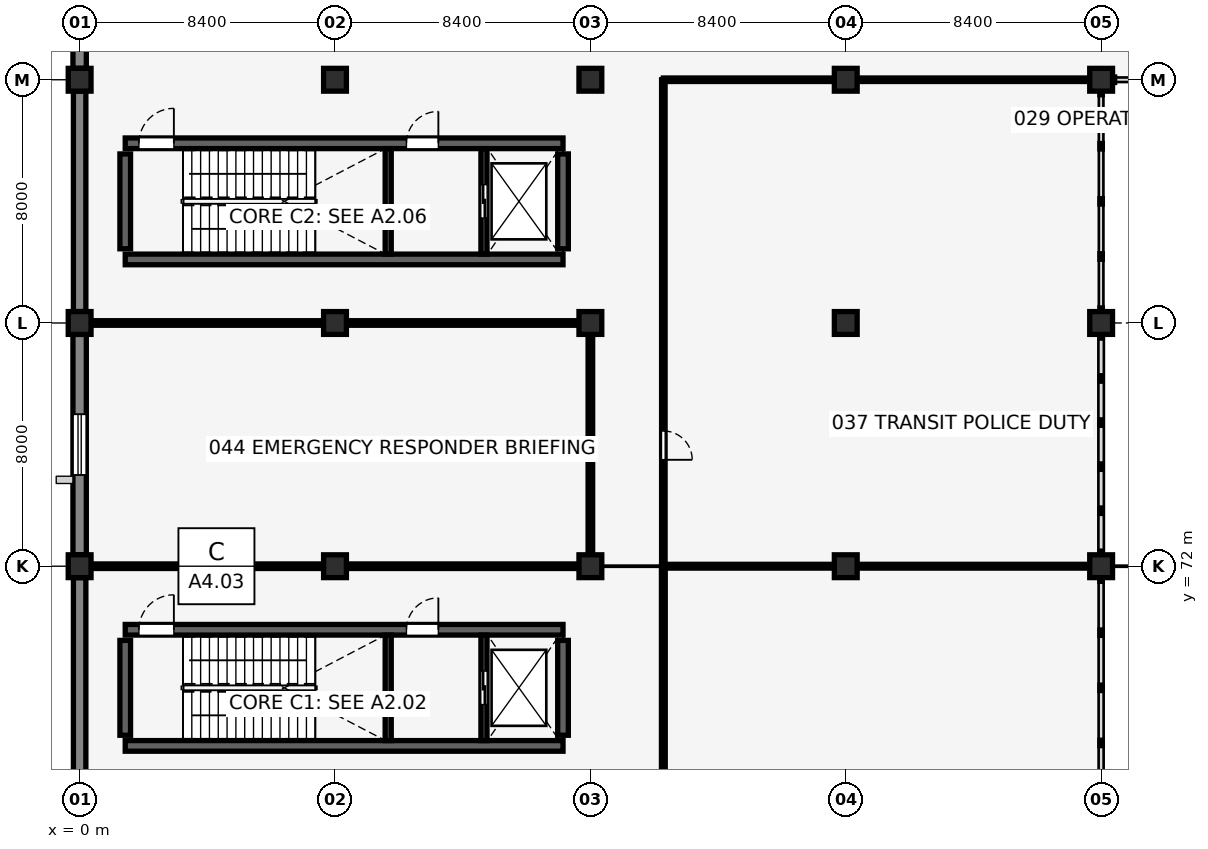
"""IFC4 building model, lengths in metres.
Left out: names, types, materials, properties, quantities, classifications, styles, units other than length and angle.
Written with IfcOpenShell. Run it as: python <this file> out.ifc"""

import sys

from ifc_helpers import new_model, si_unit, direction, frame, frame_2d, origin, origin_2d, place, context, subcontext, project, spatial, rectangle, extrude, element, fill, save


model = new_model("IFC4")
c1 = context("Model", 3, precision=1e-05, world=origin(), true_north=direction((0.0, 1.0)))
c2 = subcontext(c1, "Body", "Model", "MODEL_VIEW")
j1 = project(units=[si_unit("LENGTHUNIT", "METRE"), si_unit("PLANEANGLEUNIT", "RADIAN")], contexts=[c1])
p1 = place(None, origin())
s1 = spatial("IfcSite", under=j1, at=p1, CompositionType="ELEMENT")
p2 = place(p1, origin())
s2 = spatial("IfcBuilding", under=s1, at=p2, CompositionType="ELEMENT")
p3 = place(p2, origin())
s3 = spatial("IfcBuildingStorey", under=s2, at=p3, CompositionType="ELEMENT", Elevation=0.0)
p4 = place(p3, frame((1.5, 66.09, 0.0), z_axis=(0.0, 0.0, 1.0), x_axis=(1.0, 0.0, 0.0)))
e1 = element("IfcWall", 1, at=p4, inside=s3, PredefinedType="SHEAR", context=c2, shape_type="SweptSolid", body=[
    extrude(rectangle(XDim=14.4, YDim=0.35, at=frame_2d((7.2, 0.0))), origin(), (0.0, 0.0, 1.0), 5.15),
])
p5 = place(p3, frame((1.5, 69.91, 0.0), z_axis=(0.0, 0.0, 1.0), x_axis=(1.0, 0.0, 0.0)))
e2 = element("IfcWall", 2, at=p5, inside=s3, PredefinedType="SHEAR", context=c2, shape_type="SweptSolid", body=[
    extrude(rectangle(XDim=14.4, YDim=0.35, at=frame_2d((7.2, 0.0))), origin(), (0.0, 0.0, 1.0), 5.15),
])
p6 = place(p5, frame((0.45, 0.0, 0.0), z_axis=(0.0, 0.0, 1.0), x_axis=(1.0, 0.0, 0.0)))
e3 = element("IfcOpeningElement", 3, at=p6, cuts=e2, PredefinedType="OPENING", context=c2, shape_type="SweptSolid", body=[
    extrude(rectangle(XDim=1.15, YDim=2.15, at=frame_2d((0.575, 1.075))), frame((0.0, 0.185, 0.0), z_axis=(0.0, -1.0, 0.0), x_axis=(1.0, 0.0, 0.0)), (0.0, 0.0, 1.0), 0.37),
])
p7 = place(p5, frame((9.25, 0.0, 0.0), z_axis=(0.0, 0.0, 1.0), x_axis=(1.0, 0.0, 0.0)))
e4 = element("IfcOpeningElement", 4, at=p7, cuts=e2, PredefinedType="OPENING", context=c2, shape_type="SweptSolid", body=[
    extrude(rectangle(XDim=1.05, YDim=2.15, at=frame_2d((0.525, 1.075))), frame((0.0, 0.185, 0.0), z_axis=(0.0, -1.0, 0.0), x_axis=(1.0, 0.0, 0.0)), (0.0, 0.0, 1.0), 0.37),
])
for number, where, z_axis, x_axis in (
    (5, (1.5, 66.44, 0.0), (0.0, 0.0, 1.0), (0.0, 1.0, 0.0)),
    (6, (15.9, 66.44, 0.0), (0.0, 0.0, 1.0), (0.0, 1.0, 0.0)),
):
    element("IfcWall", number, at=place(p3, frame(where, z_axis=z_axis, x_axis=x_axis)), inside=s3, PredefinedType="SHEAR", context=c2, shape_type="SweptSolid", body=[
        extrude(rectangle(XDim=3.12, YDim=0.35, at=frame_2d((1.56, 0.0))), origin(), (0.0, 0.0, 1.0), 5.15),
    ])
p8 = place(p3, frame((1.5, 82.09, 0.0), z_axis=(0.0, 0.0, 1.0), x_axis=(1.0, 0.0, 0.0)))
e7 = element("IfcWall", 7, at=p8, inside=s3, PredefinedType="SHEAR", context=c2, shape_type="SweptSolid", body=[
    extrude(rectangle(XDim=14.4, YDim=0.35, at=frame_2d((7.2, 0.0))), origin(), (0.0, 0.0, 1.0), 5.15),
])
p9 = place(p3, frame((1.5, 85.91, 0.0), z_axis=(0.0, 0.0, 1.0), x_axis=(1.0, 0.0, 0.0)))
e8 = element("IfcWall", 8, at=p9, inside=s3, PredefinedType="SHEAR", context=c2, shape_type="SweptSolid", body=[
    extrude(rectangle(XDim=14.4, YDim=0.35, at=frame_2d((7.2, 0.0))), origin(), (0.0, 0.0, 1.0), 5.15),
])
p10 = place(p9, frame((0.45, 0.0, 0.0), z_axis=(0.0, 0.0, 1.0), x_axis=(1.0, 0.0, 0.0)))
e9 = element("IfcOpeningElement", 9, at=p10, cuts=e8, PredefinedType="OPENING", context=c2, shape_type="SweptSolid", body=[
    extrude(rectangle(XDim=1.15, YDim=2.15, at=frame_2d((0.575, 1.075))), frame((0.0, 0.185, 0.0), z_axis=(0.0, -1.0, 0.0), x_axis=(1.0, 0.0, 0.0)), (0.0, 0.0, 1.0), 0.37),
])
p11 = place(p9, frame((9.25, 0.0, 0.0), z_axis=(0.0, 0.0, 1.0), x_axis=(1.0, 0.0, 0.0)))
e10 = element("IfcOpeningElement", 10, at=p11, cuts=e8, PredefinedType="OPENING", context=c2, shape_type="SweptSolid", body=[
    extrude(rectangle(XDim=1.05, YDim=2.15, at=frame_2d((0.525, 1.075))), frame((0.0, 0.185, 0.0), z_axis=(0.0, -1.0, 0.0), x_axis=(1.0, 0.0, 0.0)), (0.0, 0.0, 1.0), 0.37),
])
for number, where, z_axis, x_axis in (
    (11, (1.5, 82.44, 0.0), (0.0, 0.0, 1.0), (0.0, 1.0, 0.0)),
    (12, (15.9, 82.44, 0.0), (0.0, 0.0, 1.0), (0.0, 1.0, 0.0)),
):
    element("IfcWall", number, at=place(p3, frame(where, z_axis=z_axis, x_axis=x_axis)), inside=s3, PredefinedType="SHEAR", context=c2, shape_type="SweptSolid", body=[
        extrude(rectangle(XDim=3.12, YDim=0.35, at=frame_2d((1.56, 0.0))), origin(), (0.0, 0.0, 1.0), 5.15),
    ])
for number, where, z_axis, x_axis in (
    (13, (0.0, 72.0, 0.0), (0.0, 0.0, 1.0), (1.0, 0.0, 0.0)),
    (14, (0.0, 80.0, 0.0), (0.0, 0.0, 1.0), (1.0, 0.0, 0.0)),
    (15, (0.0, 88.0, 0.0), (0.0, 0.0, 1.0), (1.0, 0.0, 0.0)),
    (16, (8.4, 72.0, 0.0), (0.0, 0.0, 1.0), (1.0, 0.0, 0.0)),
    (17, (8.4, 80.0, 0.0), (0.0, 0.0, 1.0), (1.0, 0.0, 0.0)),
    (18, (8.4, 88.0, 0.0), (0.0, 0.0, 1.0), (1.0, 0.0, 0.0)),
    (19, (16.8, 72.0, 0.0), (0.0, 0.0, 1.0), (1.0, 0.0, 0.0)),
    (20, (16.8, 80.0, 0.0), (0.0, 0.0, 1.0), (1.0, 0.0, 0.0)),
    (21, (16.8, 88.0, 0.0), (0.0, 0.0, 1.0), (1.0, 0.0, 0.0)),
    (22, (25.2, 72.0, 0.0), (0.0, 0.0, 1.0), (1.0, 0.0, 0.0)),
    (23, (25.2, 80.0, 0.0), (0.0, 0.0, 1.0), (1.0, 0.0, 0.0)),
    (24, (25.2, 88.0, 0.0), (0.0, 0.0, 1.0), (1.0, 0.0, 0.0)),
    (25, (33.6, 72.0, 0.0), (0.0, 0.0, 1.0), (1.0, 0.0, 0.0)),
    (26, (33.6, 80.0, 0.0), (0.0, 0.0, 1.0), (1.0, 0.0, 0.0)),
    (27, (33.6, 88.0, 0.0), (0.0, 0.0, 1.0), (1.0, 0.0, 0.0)),
):
    element("IfcColumn", number, at=place(p3, frame(where, z_axis=z_axis, x_axis=x_axis)), inside=s3, PredefinedType="COLUMN", context=c2, shape_type="SweptSolid", body=[
        extrude(rectangle(XDim=0.75, YDim=0.75, at=origin_2d()), origin(), (0.0, 0.0, 1.0), 5.15),
    ])
p12 = place(p3, frame((0.0, 64.375, 0.0), z_axis=(0.0, 0.0, 1.0), x_axis=(0.0, 1.0, 0.0)))
e28 = element("IfcWall", 28, at=p12, inside=s3, PredefinedType="SOLIDWALL", context=c2, shape_type="SweptSolid", body=[
    extrude(rectangle(XDim=7.25, YDim=0.41, at=frame_2d((3.625, 0.0))), origin(), (0.0, 0.0, 1.0), 4.85),
])
p13 = place(p3, frame((0.0, 72.375, 0.0), z_axis=(0.0, 0.0, 1.0), x_axis=(0.0, 1.0, 0.0)))
e29 = element("IfcWall", 29, at=p13, inside=s3, PredefinedType="SOLIDWALL", context=c2, shape_type="SweptSolid", body=[
    extrude(rectangle(XDim=7.25, YDim=0.44, at=frame_2d((3.625, 0.0))), origin(), (0.0, 0.0, 1.0), 4.747),
])
p14 = place(p13, frame((2.625, 0.0, 0.9), z_axis=(0.0, 0.0, 1.0), x_axis=(1.0, 0.0, 0.0)))
e30 = element("IfcOpeningElement", 30, at=p14, cuts=e29, PredefinedType="OPENING", context=c2, shape_type="SweptSolid", body=[
    extrude(rectangle(XDim=2.0, YDim=1.5, at=frame_2d((1.0, 0.75))), frame((0.0, 0.23, 0.0), z_axis=(0.0, -1.0, 0.0), x_axis=(1.0, 0.0, 0.0)), (0.0, 0.0, 1.0), 0.46),
])
p15 = place(p3, frame((0.0, 80.375, 0.0), z_axis=(0.0, 0.0, 1.0), x_axis=(0.0, 1.0, 0.0)))
e31 = element("IfcWall", 31, at=p15, inside=s3, PredefinedType="SOLIDWALL", context=c2, shape_type="SweptSolid", body=[
    extrude(rectangle(XDim=7.25, YDim=0.41, at=frame_2d((3.625, 0.0))), origin(), (0.0, 0.0, 1.0), 4.85),
])
p16 = place(p3, frame((0.0, 88.375, 0.0), z_axis=(0.0, 0.0, 1.0), x_axis=(0.0, 1.0, 0.0)))
e32 = element("IfcWall", 32, at=p16, inside=s3, PredefinedType="SOLIDWALL", context=c2, shape_type="SweptSolid", body=[
    extrude(rectangle(XDim=7.25, YDim=0.44, at=frame_2d((3.625, 0.0))), origin(), (0.0, 0.0, 1.0), 4.747),
])
p17 = place(p16, frame((2.725, 0.0, 0.9), z_axis=(0.0, 0.0, 1.0), x_axis=(1.0, 0.0, 0.0)))
e33 = element("IfcOpeningElement", 33, at=p17, cuts=e32, PredefinedType="OPENING", context=c2, shape_type="SweptSolid", body=[
    extrude(rectangle(XDim=1.8, YDim=1.45, at=frame_2d((0.9, 0.725))), frame((0.0, 0.23, 0.0), z_axis=(0.0, -1.0, 0.0), x_axis=(1.0, 0.0, 0.0)), (0.0, 0.0, 1.0), 0.46),
])
p18 = place(p3, frame((10.15, 66.265, 0.0), z_axis=(0.0, 0.0, 1.0), x_axis=(0.0, 1.0, 0.0)))
e34 = element("IfcWall", 34, at=p18, inside=s3, PredefinedType="SHEAR", context=c2, shape_type="SweptSolid", body=[
    extrude(rectangle(XDim=3.47, YDim=0.2, at=frame_2d((1.735, 0.0))), origin(), (0.0, 0.0, 1.0), 5.15),
])
p19 = place(p3, frame((13.3, 66.265, 0.0), z_axis=(0.0, 0.0, 1.0), x_axis=(0.0, 1.0, 0.0)))
e35 = element("IfcWall", 35, at=p19, inside=s3, PredefinedType="SHEAR", context=c2, shape_type="SweptSolid", body=[
    extrude(rectangle(XDim=3.47, YDim=0.2, at=frame_2d((1.735, 0.0))), origin(), (0.0, 0.0, 1.0), 5.15),
])
p20 = place(p19, frame((1.185, 0.0, 0.0), z_axis=(0.0, 0.0, 1.0), x_axis=(1.0, 0.0, 0.0)))
e36 = element("IfcOpeningElement", 36, at=p20, cuts=e35, PredefinedType="OPENING", context=c2, shape_type="SweptSolid", body=[
    extrude(rectangle(XDim=1.1, YDim=2.15, at=frame_2d((0.55, 1.075))), frame((0.0, 0.11, 0.0), z_axis=(0.0, -1.0, 0.0), x_axis=(1.0, 0.0, 0.0)), (0.0, 0.0, 1.0), 0.22),
])
p21 = place(p3, frame((10.15, 82.265, 0.0), z_axis=(0.0, 0.0, 1.0), x_axis=(0.0, 1.0, 0.0)))
e37 = element("IfcWall", 37, at=p21, inside=s3, PredefinedType="SHEAR", context=c2, shape_type="SweptSolid", body=[
    extrude(rectangle(XDim=3.47, YDim=0.2, at=frame_2d((1.735, 0.0))), origin(), (0.0, 0.0, 1.0), 5.15),
])
p22 = place(p3, frame((13.3, 82.265, 0.0), z_axis=(0.0, 0.0, 1.0), x_axis=(0.0, 1.0, 0.0)))
e38 = element("IfcWall", 38, at=p22, inside=s3, PredefinedType="SHEAR", context=c2, shape_type="SweptSolid", body=[
    extrude(rectangle(XDim=3.47, YDim=0.2, at=frame_2d((1.735, 0.0))), origin(), (0.0, 0.0, 1.0), 5.15),
])
p23 = place(p22, frame((1.185, 0.0, 0.0), z_axis=(0.0, 0.0, 1.0), x_axis=(1.0, 0.0, 0.0)))
e39 = element("IfcOpeningElement", 39, at=p23, cuts=e38, PredefinedType="OPENING", context=c2, shape_type="SweptSolid", body=[
    extrude(rectangle(XDim=1.1, YDim=2.15, at=frame_2d((0.55, 1.075))), frame((0.0, 0.11, 0.0), z_axis=(0.0, -1.0, 0.0), x_axis=(1.0, 0.0, 0.0)), (0.0, 0.0, 1.0), 0.22),
])
p24 = place(p3, frame((0.365, 72.0, 0.0), z_axis=(0.0, 0.0, 1.0), x_axis=(1.0, 0.0, 0.0)))
e40 = element("IfcWall", 40, at=p24, inside=s3, PredefinedType="PARTITIONING", context=c2, shape_type="SweptSolid", body=[
    extrude(rectangle(XDim=7.67, YDim=0.15, at=frame_2d((3.835, 0.0))), origin(), (0.0, 0.0, 1.0), 4.605),
])
p25 = place(p24, frame((3.335, 0.0, 0.0), z_axis=(0.0, 0.0, 1.0), x_axis=(1.0, 0.0, 0.0)))
e41 = element("IfcOpeningElement", 41, at=p25, cuts=e40, PredefinedType="OPENING", context=c2, shape_type="SweptSolid", body=[
    extrude(rectangle(XDim=1.0, YDim=2.15, at=frame_2d((0.5, 1.075))), frame((0.0, 0.085, 0.0), z_axis=(0.0, -1.0, 0.0), x_axis=(1.0, 0.0, 0.0)), (0.0, 0.0, 1.0), 0.17),
])
p26 = place(p3, frame((19.2, 48.04, 0.0), z_axis=(0.0, 0.0, 1.0), x_axis=(0.0, 1.0, 0.0)))
e42 = element("IfcWall", 42, at=p26, inside=s3, PredefinedType="PARTITIONING", context=c2, shape_type="SweptSolid", body=[
    extrude(rectangle(XDim=23.96, YDim=0.125, at=frame_2d((11.98, 0.0))), origin(), (0.0, 0.0, 1.0), 5.15),
])
p27 = place(p26, frame((4.44, 0.0, 0.0), z_axis=(0.0, 0.0, 1.0), x_axis=(-1.0, 0.0, 0.0)))
e43 = element("IfcOpeningElement", 43, at=p27, cuts=e42, PredefinedType="OPENING", context=c2, shape_type="SweptSolid", body=[
    extrude(rectangle(XDim=0.98, YDim=2.15, at=frame_2d((0.49, 1.075))), frame((0.0, 0.073, 0.0), z_axis=(0.0, -1.0, 0.0), x_axis=(1.0, 0.0, 0.0)), (0.0, 0.0, 1.0), 0.145),
])
p28 = place(p3, frame((19.2, 72.0, 0.0), z_axis=(0.0, 0.0, 1.0), x_axis=(0.0, 1.0, 0.0)))
e44 = element("IfcWall", 44, at=p28, inside=s3, PredefinedType="PARTITIONING", context=c2, shape_type="SweptSolid", body=[
    extrude(rectangle(XDim=16.0, YDim=0.115, at=frame_2d((8.0, 0.0))), origin(), (0.0, 0.0, 1.0), 5.15),
])
p29 = place(p28, frame((4.45, 0.0, 0.0), z_axis=(0.0, 0.0, 1.0), x_axis=(-1.0, 0.0, 0.0)))
e45 = element("IfcOpeningElement", 45, at=p29, cuts=e44, PredefinedType="OPENING", context=c2, shape_type="SweptSolid", body=[
    extrude(rectangle(XDim=0.95, YDim=2.15, at=frame_2d((0.475, 1.075))), frame((0.0, 0.067, 0.0), z_axis=(0.0, -1.0, 0.0), x_axis=(1.0, 0.0, 0.0)), (0.0, 0.0, 1.0), 0.135),
])
p30 = place(p3, frame((8.765, 72.0, 0.0), z_axis=(0.0, 0.0, 1.0), x_axis=(1.0, 0.0, 0.0)))
e46 = element("IfcWall", 46, at=p30, inside=s3, PredefinedType="PARTITIONING", context=c2, shape_type="SweptSolid", body=[
    extrude(rectangle(XDim=7.67, YDim=0.15, at=frame_2d((3.835, 0.0))), origin(), (0.0, 0.0, 1.0), 4.605),
])
p31 = place(p3, frame((0.365, 80.0, 0.0), z_axis=(0.0, 0.0, 1.0), x_axis=(1.0, 0.0, 0.0)))
e47 = element("IfcWall", 47, at=p31, inside=s3, PredefinedType="PARTITIONING", context=c2, shape_type="SweptSolid", body=[
    extrude(rectangle(XDim=7.67, YDim=0.15, at=frame_2d((3.835, 0.0))), origin(), (0.0, 0.0, 1.0), 4.605),
])
p32 = place(p3, frame((8.765, 80.0, 0.0), z_axis=(0.0, 0.0, 1.0), x_axis=(1.0, 0.0, 0.0)))
e48 = element("IfcWall", 48, at=p32, inside=s3, PredefinedType="PARTITIONING", context=c2, shape_type="SweptSolid", body=[
    extrude(rectangle(XDim=7.67, YDim=0.15, at=frame_2d((3.835, 0.0))), origin(), (0.0, 0.0, 1.0), 4.605),
])
p33 = place(p3, frame((16.8, 72.365, 0.0), z_axis=(0.0, 0.0, 1.0), x_axis=(0.0, 1.0, 0.0)))
e49 = element("IfcWall", 49, at=p33, inside=s3, PredefinedType="PARTITIONING", context=c2, shape_type="SweptSolid", body=[
    extrude(rectangle(XDim=7.27, YDim=0.15, at=frame_2d((3.635, 0.0))), origin(), (0.0, 0.0, 1.0), 4.542),
])
p34 = place(p3, frame((19.2, 72.0, 0.0), z_axis=(0.0, 0.0, 1.0), x_axis=(1.0, 0.0, 0.0)))
e50 = element("IfcWall", 50, at=p34, inside=s3, PredefinedType="PARTITIONING", context=c2, shape_type="SweptSolid", body=[
    extrude(rectangle(XDim=5.635, YDim=0.125, at=frame_2d((2.817, 0.0))), origin(), (0.0, 0.0, 1.0), 4.605),
])
p35 = place(p3, frame((25.565, 72.0, 0.0), z_axis=(0.0, 0.0, 1.0), x_axis=(1.0, 0.0, 0.0)))
e51 = element("IfcWall", 51, at=p35, inside=s3, PredefinedType="PARTITIONING", context=c2, shape_type="SweptSolid", body=[
    extrude(rectangle(XDim=7.67, YDim=0.125, at=frame_2d((3.835, 0.0))), origin(), (0.0, 0.0, 1.0), 4.605),
])
p36 = place(p3, frame((19.2, 88.0, 0.0), z_axis=(0.0, 0.0, 1.0), x_axis=(1.0, 0.0, 0.0)))
e52 = element("IfcWall", 52, at=p36, inside=s3, PredefinedType="PARTITIONING", context=c2, shape_type="SweptSolid", body=[
    extrude(rectangle(XDim=5.635, YDim=0.115, at=frame_2d((2.817, 0.0))), origin(), (0.0, 0.0, 1.0), 4.605),
])
p37 = place(p3, frame((25.565, 88.0, 0.0), z_axis=(0.0, 0.0, 1.0), x_axis=(1.0, 0.0, 0.0)))
e53 = element("IfcWall", 53, at=p37, inside=s3, PredefinedType="PARTITIONING", context=c2, shape_type="SweptSolid", body=[
    extrude(rectangle(XDim=7.67, YDim=0.115, at=frame_2d((3.835, 0.0))), origin(), (0.0, 0.0, 1.0), 4.605),
])
p38 = place(p14, origin())
e54 = element("IfcWindow", 54, at=p38, inside=s3, PartitioningType="DOUBLE_PANEL_VERTICAL", PredefinedType="WINDOW", context=c2, shape_type="SweptSolid", body=[
    extrude(rectangle(XDim=2.0, YDim=1.5, at=frame_2d((1.0, 0.75))), frame((0.0, 0.03, 0.0), z_axis=(0.0, -1.0, 0.0), x_axis=(1.0, 0.0, 0.0)), (0.0, 0.0, 1.0), 0.06),
])
fill(e30, e54)
p39 = place(p6, origin())
e55 = element("IfcDoor", 55, at=p39, inside=s3, OperationType="SINGLE_SWING_RIGHT", PredefinedType="DOOR", context=c2, shape_type="SweptSolid", body=[
    extrude(rectangle(XDim=1.15, YDim=2.15, at=frame_2d((0.575, 1.075))), frame((0.0, 0.025, 0.0), z_axis=(0.0, -1.0, 0.0), x_axis=(1.0, 0.0, 0.0)), (0.0, 0.0, 1.0), 0.05),
])
fill(e3, e55)
p40 = place(p7, origin())
e56 = element("IfcDoor", 56, at=p40, inside=s3, OperationType="SINGLE_SWING_RIGHT", PredefinedType="DOOR", context=c2, shape_type="SweptSolid", body=[
    extrude(rectangle(XDim=1.05, YDim=2.15, at=frame_2d((0.525, 1.075))), frame((0.0, 0.025, 0.0), z_axis=(0.0, -1.0, 0.0), x_axis=(1.0, 0.0, 0.0)), (0.0, 0.0, 1.0), 0.05),
])
fill(e4, e56)
p41 = place(p20, origin())
e57 = element("IfcDoor", 57, at=p41, inside=s3, OperationType="DOUBLE_DOOR_SLIDING", PredefinedType="DOOR", context=c2, shape_type="SweptSolid", body=[
    extrude(rectangle(XDim=1.1, YDim=2.15, at=frame_2d((0.55, 1.075))), frame((0.0, 0.025, 0.0), z_axis=(0.0, -1.0, 0.0), x_axis=(1.0, 0.0, 0.0)), (0.0, 0.0, 1.0), 0.05),
])
fill(e36, e57)
p42 = place(p10, origin())
e58 = element("IfcDoor", 58, at=p42, inside=s3, OperationType="SINGLE_SWING_RIGHT", PredefinedType="DOOR", context=c2, shape_type="SweptSolid", body=[
    extrude(rectangle(XDim=1.15, YDim=2.15, at=frame_2d((0.575, 1.075))), frame((0.0, 0.025, 0.0), z_axis=(0.0, -1.0, 0.0), x_axis=(1.0, 0.0, 0.0)), (0.0, 0.0, 1.0), 0.05),
])
fill(e9, e58)
p43 = place(p11, origin())
e59 = element("IfcDoor", 59, at=p43, inside=s3, OperationType="SINGLE_SWING_RIGHT", PredefinedType="DOOR", context=c2, shape_type="SweptSolid", body=[
    extrude(rectangle(XDim=1.05, YDim=2.15, at=frame_2d((0.525, 1.075))), frame((0.0, 0.025, 0.0), z_axis=(0.0, -1.0, 0.0), x_axis=(1.0, 0.0, 0.0)), (0.0, 0.0, 1.0), 0.05),
])
fill(e10, e59)
p44 = place(p23, origin())
e60 = element("IfcDoor", 60, at=p44, inside=s3, OperationType="DOUBLE_DOOR_SLIDING", PredefinedType="DOOR", context=c2, shape_type="SweptSolid", body=[
    extrude(rectangle(XDim=1.1, YDim=2.15, at=frame_2d((0.55, 1.075))), frame((0.0, 0.025, 0.0), z_axis=(0.0, -1.0, 0.0), x_axis=(1.0, 0.0, 0.0)), (0.0, 0.0, 1.0), 0.05),
])
fill(e39, e60)
p45 = place(p25, origin())
e61 = element("IfcDoor", 61, at=p45, inside=s3, OperationType="SINGLE_SWING_LEFT", PredefinedType="DOOR", context=c2, shape_type="SweptSolid", body=[
    extrude(rectangle(XDim=1.0, YDim=2.15, at=frame_2d((0.5, 1.075))), frame((0.0, 0.025, 0.0), z_axis=(0.0, -1.0, 0.0), x_axis=(1.0, 0.0, 0.0)), (0.0, 0.0, 1.0), 0.05),
])
fill(e41, e61)
p46 = place(p29, origin())
e62 = element("IfcDoor", 62, at=p46, inside=s3, OperationType="SINGLE_SWING_RIGHT", PredefinedType="DOOR", context=c2, shape_type="SweptSolid", body=[
    extrude(rectangle(XDim=0.95, YDim=2.15, at=frame_2d((0.475, 1.075))), frame((0.0, 0.025, 0.0), z_axis=(0.0, -1.0, 0.0), x_axis=(1.0, 0.0, 0.0)), (0.0, 0.0, 1.0), 0.05),
])
fill(e45, e62)
save(model, sys.argv[1])
